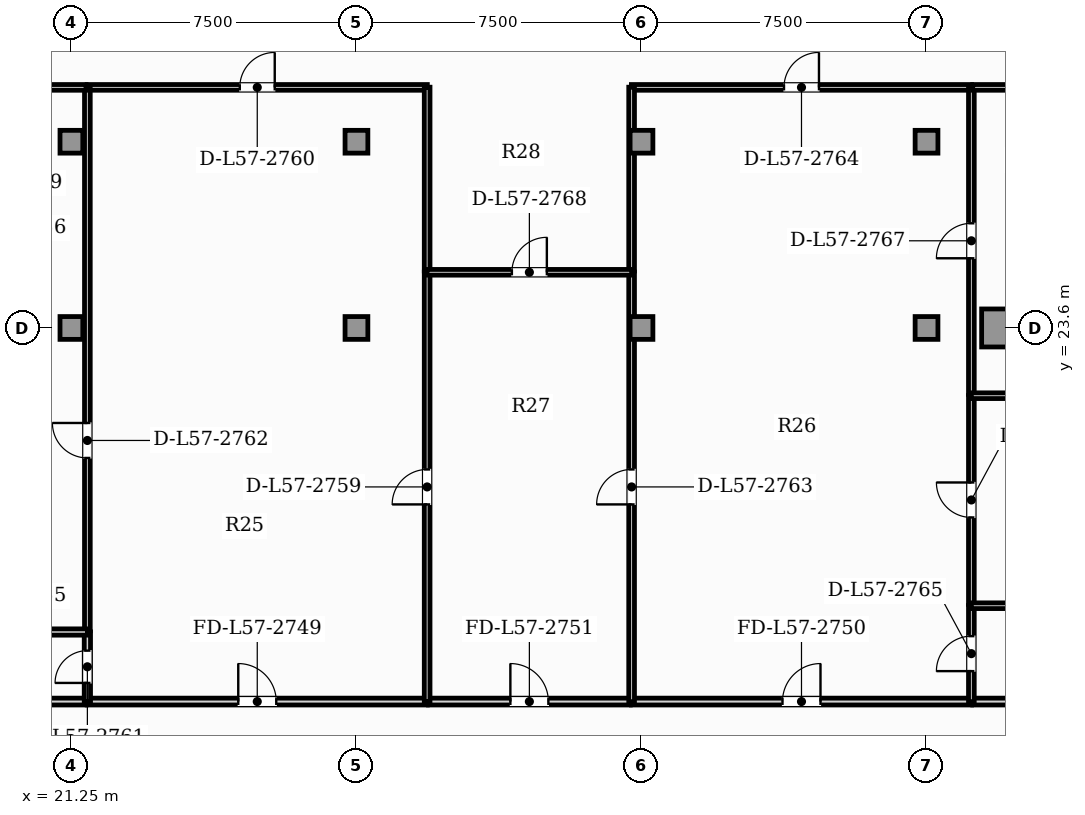
"""IFC4 building model, lengths in metres.
Left out: names, types, materials, properties, quantities, classifications, styles, units other than length and angle.
Written with IfcOpenShell. Run it as: python <this file> out.ifc"""

import sys

from ifc_helpers import new_model, si_unit, direction, frame, frame_2d, origin, origin_2d, place, context, subcontext, project, spatial, rectangle, hollow_rectangle, extrude, element, fill, save


model = new_model("IFC4")
c1 = context("Model", 3, precision=1e-05, world=origin(), true_north=direction((0.0, 1.0)))
c2 = subcontext(c1, "Body", "Model", "MODEL_VIEW")
j1 = project(units=[si_unit("LENGTHUNIT", "METRE"), si_unit("PLANEANGLEUNIT", "RADIAN")], contexts=[c1])
p1 = place(None, origin())
s1 = spatial("IfcSite", under=j1, at=p1, CompositionType="ELEMENT")
p2 = place(p1, origin())
s2 = spatial("IfcBuilding", under=s1, at=p2, CompositionType="ELEMENT")
p3 = place(p2, frame((0.0, 0.0, 231.1)))
s3 = spatial("IfcBuildingStorey", under=s2, at=p3, CompositionType="ELEMENT", Elevation=231.1)
p4 = place(p3, frame((45.7, 23.6, 0.0), z_axis=(0.0, 0.0, 1.0), x_axis=(1.0, 0.0, 0.0)))
e1 = element("IfcColumn", 1, at=p4, inside=s3, PredefinedType="USERDEFINED", context=c2, shape_type="SweptSolid", body=[
    extrude(hollow_rectangle(XDim=1.0, YDim=1.0, WallThickness=0.06, at=origin_2d()), origin(), (0.0, 0.0, 1.0), 3.85),
])
for number, where, z_axis, x_axis in (
    (2, (21.25, 23.6, 0.0), (0.0, 0.0, 1.0), (1.0, 0.0, 0.0)),
    (3, (28.75, 23.6, 0.0), (0.0, 0.0, 1.0), (1.0, 0.0, 0.0)),
    (4, (36.25, 23.6, 0.0), (0.0, 0.0, 1.0), (1.0, 0.0, 0.0)),
    (5, (43.75, 23.6, 0.0), (0.0, 0.0, 1.0), (1.0, 0.0, 0.0)),
    (6, (21.25, 28.5, 0.0), (0.0, 0.0, 1.0), (1.0, 0.0, 0.0)),
    (7, (28.75, 28.5, 0.0), (0.0, 0.0, 1.0), (1.0, 0.0, 0.0)),
    (8, (36.25, 28.5, 0.0), (0.0, 0.0, 1.0), (1.0, 0.0, 0.0)),
    (9, (43.75, 28.5, 0.0), (0.0, 0.0, 1.0), (1.0, 0.0, 0.0)),
):
    element("IfcColumn", number, at=place(p3, frame(where, z_axis=z_axis, x_axis=x_axis)), inside=s3, PredefinedType="COLUMN", context=c2, shape_type="SweptSolid", body=[
        extrude(rectangle(XDim=0.6, YDim=0.6, at=origin_2d()), origin(), (0.0, 0.0, 1.0), 3.85),
    ])
p5 = place(p3, frame((21.665, 13.77, 0.0), z_axis=(0.0, 0.0, 1.0), x_axis=(1.0, 0.0, 0.0)))
e10 = element("IfcWall", 10, at=p5, inside=s3, PredefinedType="PARTITIONING", context=c2, shape_type="SweptSolid", body=[
    extrude(rectangle(XDim=8.95, YDim=0.18, at=frame_2d((4.475, 0.0))), origin(), (0.0, 0.0, 1.0), 3.63),
])
p6 = place(p5, frame((3.975, 0.0, 0.0)))
e11 = element("IfcOpeningElement", 11, at=p6, cuts=e10, PredefinedType="OPENING", context=c2, shape_type="SweptSolid", body=[
    extrude(rectangle(XDim=1.0, YDim=2.15, at=frame_2d((0.5, 1.075))), frame((0.0, 0.1, 0.0), z_axis=(0.0, -1.0, 0.0), x_axis=(1.0, 0.0, 0.0)), (0.0, 0.0, 1.0), 0.2),
])
p7 = place(p3, frame((35.985, 13.77, 0.0), z_axis=(0.0, 0.0, 1.0), x_axis=(1.0, 0.0, 0.0)))
e12 = element("IfcWall", 12, at=p7, inside=s3, PredefinedType="PARTITIONING", context=c2, shape_type="SweptSolid", body=[
    extrude(rectangle(XDim=8.95, YDim=0.18, at=frame_2d((4.475, 0.0))), origin(), (0.0, 0.0, 1.0), 3.63),
])
p8 = place(p7, frame((3.975, 0.0, 0.0)))
e13 = element("IfcOpeningElement", 13, at=p8, cuts=e12, PredefinedType="OPENING", context=c2, shape_type="SweptSolid", body=[
    extrude(rectangle(XDim=1.0, YDim=2.15, at=frame_2d((0.5, 1.075))), frame((0.0, 0.1, 0.0), z_axis=(0.0, -1.0, 0.0), x_axis=(1.0, 0.0, 0.0)), (0.0, 0.0, 1.0), 0.2),
])
p9 = place(p3, frame((30.645, 13.77, 0.0), z_axis=(0.0, 0.0, 1.0), x_axis=(1.0, 0.0, 0.0)))
e14 = element("IfcWall", 14, at=p9, inside=s3, PredefinedType="PARTITIONING", context=c2, shape_type="SweptSolid", body=[
    extrude(rectangle(XDim=5.31, YDim=0.18, at=frame_2d((2.655, 0.0))), origin(), (0.0, 0.0, 1.0), 3.63),
])
p10 = place(p9, frame((2.155, 0.0, 0.0)))
e15 = element("IfcOpeningElement", 15, at=p10, cuts=e14, PredefinedType="OPENING", context=c2, shape_type="SweptSolid", body=[
    extrude(rectangle(XDim=1.0, YDim=2.15, at=frame_2d((0.5, 1.075))), frame((0.0, 0.1, 0.0), z_axis=(0.0, -1.0, 0.0), x_axis=(1.0, 0.0, 0.0)), (0.0, 0.0, 1.0), 0.2),
])
p11 = place(p3, frame((17.385, 13.77, 0.0), z_axis=(0.0, 0.0, 1.0), x_axis=(1.0, 0.0, 0.0)))
e16 = element("IfcWall", 16, at=p11, inside=s3, PredefinedType="PARTITIONING", context=c2, shape_type="SweptSolid", body=[
    extrude(rectangle(XDim=4.25, YDim=0.18, at=frame_2d((2.125, 0.0))), origin(), (0.0, 0.0, 1.0), 3.63),
])
p12 = place(p3, frame((44.965, 13.77, 0.0), z_axis=(0.0, 0.0, 1.0), x_axis=(1.0, 0.0, 0.0)))
e17 = element("IfcWall", 17, at=p12, inside=s3, PredefinedType="PARTITIONING", context=c2, shape_type="SweptSolid", body=[
    extrude(rectangle(XDim=4.862, YDim=0.18, at=frame_2d((2.431, 0.0))), origin(), (0.0, 0.0, 1.0), 3.63),
])
p13 = place(p3, frame((30.61, 13.765, 0.0), z_axis=(0.0, 0.0, 1.0), x_axis=(0.0, 1.0, 0.0)))
e18 = element("IfcWall", 18, at=p13, inside=s3, PredefinedType="PARTITIONING", context=c2, shape_type="SweptSolid", body=[
    extrude(rectangle(XDim=11.305, YDim=0.15, at=frame_2d((5.652, 0.0))), origin(), (0.0, 0.0, 1.0), 3.63),
])
p14 = place(p13, frame((5.192, 0.0, 0.0)))
e19 = element("IfcOpeningElement", 19, at=p14, cuts=e18, PredefinedType="OPENING", context=c2, shape_type="SweptSolid", body=[
    extrude(rectangle(XDim=0.92, YDim=2.1, at=frame_2d((0.46, 1.05))), frame((0.0, 0.085, 0.0), z_axis=(0.0, -1.0, 0.0), x_axis=(1.0, 0.0, 0.0)), (0.0, 0.0, 1.0), 0.17),
])
p15 = place(p3, frame((21.665, 29.93, 0.0), z_axis=(0.0, 0.0, 1.0), x_axis=(1.0, 0.0, 0.0)))
e20 = element("IfcWall", 20, at=p15, inside=s3, PredefinedType="PARTITIONING", context=c2, shape_type="SweptSolid", body=[
    extrude(rectangle(XDim=8.95, YDim=0.15, at=frame_2d((4.475, 0.0))), origin(), (0.0, 0.0, 1.0), 3.63),
])
p16 = place(p15, frame((4.015, 0.0, 0.0)))
e21 = element("IfcOpeningElement", 21, at=p16, cuts=e20, PredefinedType="OPENING", context=c2, shape_type="SweptSolid", body=[
    extrude(rectangle(XDim=0.92, YDim=2.1, at=frame_2d((0.46, 1.05))), frame((0.0, 0.085, 0.0), z_axis=(0.0, -1.0, 0.0), x_axis=(1.0, 0.0, 0.0)), (0.0, 0.0, 1.0), 0.17),
])
p17 = place(p3, frame((30.61, 25.1, 0.0), z_axis=(0.0, 0.0, 1.0), x_axis=(0.0, 1.0, 0.0)))
e22 = element("IfcWall", 22, at=p17, inside=s3, PredefinedType="PARTITIONING", context=c2, shape_type="SweptSolid", body=[
    extrude(rectangle(XDim=4.835, YDim=0.15, at=frame_2d((2.417, 0.0))), origin(), (0.0, 0.0, 1.0), 3.63),
])
p18 = place(p3, frame((21.67, 13.765, 0.0), z_axis=(0.0, 0.0, 1.0), x_axis=(0.0, 1.0, 0.0)))
e23 = element("IfcWall", 23, at=p18, inside=s3, PredefinedType="PLUMBINGWALL", context=c2, shape_type="SweptSolid", body=[
    extrude(rectangle(XDim=1.84, YDim=0.165, at=frame_2d((0.92, 0.0))), origin(), (0.0, 0.0, 1.0), 3.63),
])
p19 = place(p18, frame((0.495, 0.0, 0.0)))
e24 = element("IfcOpeningElement", 24, at=p19, cuts=e23, PredefinedType="OPENING", context=c2, shape_type="SweptSolid", body=[
    extrude(rectangle(XDim=0.85, YDim=2.1, at=frame_2d((0.425, 1.05))), frame((0.0, 0.093, 0.0), z_axis=(0.0, -1.0, 0.0), x_axis=(1.0, 0.0, 0.0)), (0.0, 0.0, 1.0), 0.185),
])
p20 = place(p3, frame((21.67, 15.635, 0.0), z_axis=(0.0, 0.0, 1.0), x_axis=(0.0, 1.0, 0.0)))
e25 = element("IfcWall", 25, at=p20, inside=s3, PredefinedType="PARTITIONING", context=c2, shape_type="SweptSolid", body=[
    extrude(rectangle(XDim=14.3, YDim=0.15, at=frame_2d((7.15, 0.0))), origin(), (0.0, 0.0, 1.0), 3.63),
])
p21 = place(p20, frame((4.545, 0.0, 0.0)))
e26 = element("IfcOpeningElement", 26, at=p21, cuts=e25, PredefinedType="OPENING", context=c2, shape_type="SweptSolid", body=[
    extrude(rectangle(XDim=0.92, YDim=2.1, at=frame_2d((0.46, 1.05))), frame((0.0, 0.085, 0.0), z_axis=(0.0, -1.0, 0.0), x_axis=(1.0, 0.0, 0.0)), (0.0, 0.0, 1.0), 0.17),
])
p22 = place(p3, frame((35.99, 13.765, 0.0), z_axis=(0.0, 0.0, 1.0), x_axis=(0.0, 1.0, 0.0)))
e27 = element("IfcWall", 27, at=p22, inside=s3, PredefinedType="PARTITIONING", context=c2, shape_type="SweptSolid", body=[
    extrude(rectangle(XDim=11.305, YDim=0.15, at=frame_2d((5.652, 0.0))), origin(), (0.0, 0.0, 1.0), 3.63),
])
p23 = place(p22, frame((5.192, 0.0, 0.0)))
e28 = element("IfcOpeningElement", 28, at=p23, cuts=e27, PredefinedType="OPENING", context=c2, shape_type="SweptSolid", body=[
    extrude(rectangle(XDim=0.92, YDim=2.1, at=frame_2d((0.46, 1.05))), frame((0.0, 0.085, 0.0), z_axis=(0.0, -1.0, 0.0), x_axis=(1.0, 0.0, 0.0)), (0.0, 0.0, 1.0), 0.17),
])
p24 = place(p3, frame((35.985, 29.93, 0.0), z_axis=(0.0, 0.0, 1.0), x_axis=(1.0, 0.0, 0.0)))
e29 = element("IfcWall", 29, at=p24, inside=s3, PredefinedType="PARTITIONING", context=c2, shape_type="SweptSolid", body=[
    extrude(rectangle(XDim=8.95, YDim=0.15, at=frame_2d((4.475, 0.0))), origin(), (0.0, 0.0, 1.0), 3.63),
])
p25 = place(p24, frame((4.015, 0.0, 0.0)))
e30 = element("IfcOpeningElement", 30, at=p25, cuts=e29, PredefinedType="OPENING", context=c2, shape_type="SweptSolid", body=[
    extrude(rectangle(XDim=0.92, YDim=2.1, at=frame_2d((0.46, 1.05))), frame((0.0, 0.085, 0.0), z_axis=(0.0, -1.0, 0.0), x_axis=(1.0, 0.0, 0.0)), (0.0, 0.0, 1.0), 0.17),
])
p26 = place(p3, frame((35.99, 25.1, 0.0), z_axis=(0.0, 0.0, 1.0), x_axis=(0.0, 1.0, 0.0)))
e31 = element("IfcWall", 31, at=p26, inside=s3, PredefinedType="PARTITIONING", context=c2, shape_type="SweptSolid", body=[
    extrude(rectangle(XDim=4.835, YDim=0.15, at=frame_2d((2.417, 0.0))), origin(), (0.0, 0.0, 1.0), 3.63),
])
p27 = place(p3, frame((44.93, 13.765, 0.0), z_axis=(0.0, 0.0, 1.0), x_axis=(0.0, 1.0, 0.0)))
e32 = element("IfcWall", 32, at=p27, inside=s3, PredefinedType="PARTITIONING", context=c2, shape_type="SweptSolid", body=[
    extrude(rectangle(XDim=2.531, YDim=0.15, at=frame_2d((1.266, 0.0))), origin(), (0.0, 0.0, 1.0), 3.63),
])
p28 = place(p27, frame((0.806, 0.0, 0.0)))
e33 = element("IfcOpeningElement", 33, at=p28, cuts=e32, PredefinedType="OPENING", context=c2, shape_type="SweptSolid", body=[
    extrude(rectangle(XDim=0.92, YDim=2.1, at=frame_2d((0.46, 1.05))), frame((0.0, 0.085, 0.0), z_axis=(0.0, -1.0, 0.0), x_axis=(1.0, 0.0, 0.0)), (0.0, 0.0, 1.0), 0.17),
])
p29 = place(p3, frame((44.93, 16.326, 0.0), z_axis=(0.0, 0.0, 1.0), x_axis=(0.0, 1.0, 0.0)))
e34 = element("IfcWall", 34, at=p29, inside=s3, PredefinedType="PARTITIONING", context=c2, shape_type="SweptSolid", body=[
    extrude(rectangle(XDim=5.496, YDim=0.15, at=frame_2d((2.748, 0.0))), origin(), (0.0, 0.0, 1.0), 3.63),
])
p30 = place(p29, frame((2.288, 0.0, 0.0)))
e35 = element("IfcOpeningElement", 35, at=p30, cuts=e34, PredefinedType="OPENING", context=c2, shape_type="SweptSolid", body=[
    extrude(rectangle(XDim=0.92, YDim=2.1, at=frame_2d((0.46, 1.05))), frame((0.0, 0.085, 0.0), z_axis=(0.0, -1.0, 0.0), x_axis=(1.0, 0.0, 0.0)), (0.0, 0.0, 1.0), 0.17),
])
p31 = place(p3, frame((44.93, 21.853, 0.0), z_axis=(0.0, 0.0, 1.0), x_axis=(0.0, 1.0, 0.0)))
e36 = element("IfcWall", 36, at=p31, inside=s3, PredefinedType="PARTITIONING", context=c2, shape_type="SweptSolid", body=[
    extrude(rectangle(XDim=8.083, YDim=0.15, at=frame_2d((4.041, 0.0))), origin(), (0.0, 0.0, 1.0), 3.63),
])
p32 = place(p31, frame((3.581, 0.0, 0.0)))
e37 = element("IfcOpeningElement", 37, at=p32, cuts=e36, PredefinedType="OPENING", context=c2, shape_type="SweptSolid", body=[
    extrude(rectangle(XDim=0.92, YDim=2.1, at=frame_2d((0.46, 1.05))), frame((0.0, 0.085, 0.0), z_axis=(0.0, -1.0, 0.0), x_axis=(1.0, 0.0, 0.0)), (0.0, 0.0, 1.0), 0.17),
])
p33 = place(p3, frame((30.605, 25.065, 0.0), z_axis=(0.0, 0.0, 1.0), x_axis=(1.0, 0.0, 0.0)))
e38 = element("IfcWall", 38, at=p33, inside=s3, PredefinedType="PARTITIONING", context=c2, shape_type="SweptSolid", body=[
    extrude(rectangle(XDim=5.39, YDim=0.15, at=frame_2d((2.695, 0.0))), origin(), (0.0, 0.0, 1.0), 3.63),
])
p34 = place(p33, frame((2.235, 0.0, 0.0)))
e39 = element("IfcOpeningElement", 39, at=p34, cuts=e38, PredefinedType="OPENING", context=c2, shape_type="SweptSolid", body=[
    extrude(rectangle(XDim=0.92, YDim=2.1, at=frame_2d((0.46, 1.05))), frame((0.0, 0.085, 0.0), z_axis=(0.0, -1.0, 0.0), x_axis=(1.0, 0.0, 0.0)), (0.0, 0.0, 1.0), 0.17),
])
p35 = place(p3, frame((17.385, 29.93, 0.0), z_axis=(0.0, 0.0, 1.0), x_axis=(1.0, 0.0, 0.0)))
e40 = element("IfcWall", 40, at=p35, inside=s3, PredefinedType="PARTITIONING", context=c2, shape_type="SweptSolid", body=[
    extrude(rectangle(XDim=4.25, YDim=0.15, at=frame_2d((2.125, 0.0))), origin(), (0.0, 0.0, 1.0), 3.63),
])
p36 = place(p35, frame((1.665, 0.0, 0.0)))
e41 = element("IfcOpeningElement", 41, at=p36, cuts=e40, PredefinedType="OPENING", context=c2, shape_type="SweptSolid", body=[
    extrude(rectangle(XDim=0.92, YDim=2.1, at=frame_2d((0.46, 1.05))), frame((0.0, 0.085, 0.0), z_axis=(0.0, -1.0, 0.0), x_axis=(1.0, 0.0, 0.0)), (0.0, 0.0, 1.0), 0.17),
])
p37 = place(p3, frame((44.965, 29.93, 0.0), z_axis=(0.0, 0.0, 1.0), x_axis=(1.0, 0.0, 0.0)))
e42 = element("IfcWall", 42, at=p37, inside=s3, PredefinedType="PARTITIONING", context=c2, shape_type="SweptSolid", body=[
    extrude(rectangle(XDim=4.862, YDim=0.15, at=frame_2d((2.431, 0.0))), origin(), (0.0, 0.0, 1.0), 3.63),
])
p38 = place(p37, frame((1.971, 0.0, 0.0)))
e43 = element("IfcOpeningElement", 43, at=p38, cuts=e42, PredefinedType="OPENING", context=c2, shape_type="SweptSolid", body=[
    extrude(rectangle(XDim=0.92, YDim=2.1, at=frame_2d((0.46, 1.05))), frame((0.0, 0.085, 0.0), z_axis=(0.0, -1.0, 0.0), x_axis=(1.0, 0.0, 0.0)), (0.0, 0.0, 1.0), 0.17),
])
p39 = place(p3, frame((17.385, 15.6, 0.0), z_axis=(0.0, 0.0, 1.0), x_axis=(1.0, 0.0, 0.0)))
e44 = element("IfcWall", 44, at=p39, inside=s3, PredefinedType="PLUMBINGWALL", context=c2, shape_type="SweptSolid", body=[
    extrude(rectangle(XDim=4.29, YDim=0.165, at=frame_2d((2.145, 0.0))), origin(), (0.0, 0.0, 1.0), 3.63),
])
for number, where, z_axis, x_axis in (
    (45, (44.925, 16.292, 0.0), (0.0, 0.0, 1.0), (1.0, 0.0, 0.0)),
    (46, (44.925, 21.817, 0.0), (0.0, 0.0, 1.0), (1.0, 0.0, 0.0)),
):
    element("IfcWall", number, at=place(p3, frame(where, z_axis=z_axis, x_axis=x_axis)), inside=s3, PredefinedType="PARTITIONING", context=c2, shape_type="SweptSolid", body=[
        extrude(rectangle(XDim=4.902, YDim=0.15, at=frame_2d((2.451, 0.0))), origin(), (0.0, 0.0, 1.0), 3.63),
    ])
p40 = place(p6, origin())
e47 = element("IfcDoor", 47, at=p40, inside=s3, OperationType="SINGLE_SWING_LEFT", PredefinedType="DOOR", context=c2, shape_type="SweptSolid", body=[
    extrude(rectangle(XDim=1.0, YDim=2.15, at=frame_2d((0.5, 1.075))), frame((0.0, 0.025, 0.0), z_axis=(0.0, -1.0, 0.0), x_axis=(1.0, 0.0, 0.0)), (0.0, 0.0, 1.0), 0.05),
])
fill(e11, e47)
p41 = place(p8, origin())
e48 = element("IfcDoor", 48, at=p41, inside=s3, OperationType="SINGLE_SWING_RIGHT", PredefinedType="DOOR", context=c2, shape_type="SweptSolid", body=[
    extrude(rectangle(XDim=1.0, YDim=2.15, at=frame_2d((0.5, 1.075))), frame((0.0, 0.025, 0.0), z_axis=(0.0, -1.0, 0.0), x_axis=(1.0, 0.0, 0.0)), (0.0, 0.0, 1.0), 0.05),
])
fill(e13, e48)
p42 = place(p10, origin())
e49 = element("IfcDoor", 49, at=p42, inside=s3, OperationType="SINGLE_SWING_LEFT", PredefinedType="DOOR", context=c2, shape_type="SweptSolid", body=[
    extrude(rectangle(XDim=1.0, YDim=2.15, at=frame_2d((0.5, 1.075))), frame((0.0, 0.025, 0.0), z_axis=(0.0, -1.0, 0.0), x_axis=(1.0, 0.0, 0.0)), (0.0, 0.0, 1.0), 0.05),
])
fill(e15, e49)
p43 = place(p14, origin())
e50 = element("IfcDoor", 50, at=p43, inside=s3, OperationType="SINGLE_SWING_LEFT", PredefinedType="DOOR", context=c2, shape_type="SweptSolid", body=[
    extrude(rectangle(XDim=0.92, YDim=2.1, at=frame_2d((0.46, 1.05))), frame((0.0, 0.025, 0.0), z_axis=(0.0, -1.0, 0.0), x_axis=(1.0, 0.0, 0.0)), (0.0, 0.0, 1.0), 0.05),
])
fill(e19, e50)
p44 = place(p16, origin())
e51 = element("IfcDoor", 51, at=p44, inside=s3, OperationType="SINGLE_SWING_RIGHT", PredefinedType="DOOR", context=c2, shape_type="SweptSolid", body=[
    extrude(rectangle(XDim=0.92, YDim=2.1, at=frame_2d((0.46, 1.05))), frame((0.0, 0.025, 0.0), z_axis=(0.0, -1.0, 0.0), x_axis=(1.0, 0.0, 0.0)), (0.0, 0.0, 1.0), 0.05),
])
fill(e21, e51)
p45 = place(p19, origin())
e52 = element("IfcDoor", 52, at=p45, inside=s3, OperationType="SINGLE_SWING_LEFT", PredefinedType="DOOR", context=c2, shape_type="SweptSolid", body=[
    extrude(rectangle(XDim=0.85, YDim=2.1, at=frame_2d((0.425, 1.05))), frame((0.0, 0.025, 0.0), z_axis=(0.0, -1.0, 0.0), x_axis=(1.0, 0.0, 0.0)), (0.0, 0.0, 1.0), 0.05),
])
fill(e24, e52)
p46 = place(p21, origin())
e53 = element("IfcDoor", 53, at=p46, inside=s3, OperationType="SINGLE_SWING_RIGHT", PredefinedType="DOOR", context=c2, shape_type="SweptSolid", body=[
    extrude(rectangle(XDim=0.92, YDim=2.1, at=frame_2d((0.46, 1.05))), frame((0.0, 0.025, 0.0), z_axis=(0.0, -1.0, 0.0), x_axis=(1.0, 0.0, 0.0)), (0.0, 0.0, 1.0), 0.05),
])
fill(e26, e53)
p47 = place(p23, origin())
e54 = element("IfcDoor", 54, at=p47, inside=s3, OperationType="SINGLE_SWING_LEFT", PredefinedType="DOOR", context=c2, shape_type="SweptSolid", body=[
    extrude(rectangle(XDim=0.92, YDim=2.1, at=frame_2d((0.46, 1.05))), frame((0.0, 0.025, 0.0), z_axis=(0.0, -1.0, 0.0), x_axis=(1.0, 0.0, 0.0)), (0.0, 0.0, 1.0), 0.05),
])
fill(e28, e54)
p48 = place(p25, origin())
e55 = element("IfcDoor", 55, at=p48, inside=s3, OperationType="SINGLE_SWING_RIGHT", PredefinedType="DOOR", context=c2, shape_type="SweptSolid", body=[
    extrude(rectangle(XDim=0.92, YDim=2.1, at=frame_2d((0.46, 1.05))), frame((0.0, 0.025, 0.0), z_axis=(0.0, -1.0, 0.0), x_axis=(1.0, 0.0, 0.0)), (0.0, 0.0, 1.0), 0.05),
])
fill(e30, e55)
p49 = place(p28, origin())
e56 = element("IfcDoor", 56, at=p49, inside=s3, OperationType="SINGLE_SWING_LEFT", PredefinedType="DOOR", context=c2, shape_type="SweptSolid", body=[
    extrude(rectangle(XDim=0.92, YDim=2.1, at=frame_2d((0.46, 1.05))), frame((0.0, 0.025, 0.0), z_axis=(0.0, -1.0, 0.0), x_axis=(1.0, 0.0, 0.0)), (0.0, 0.0, 1.0), 0.05),
])
fill(e33, e56)
p50 = place(p30, origin())
e57 = element("IfcDoor", 57, at=p50, inside=s3, OperationType="SINGLE_SWING_RIGHT", PredefinedType="DOOR", context=c2, shape_type="SweptSolid", body=[
    extrude(rectangle(XDim=0.92, YDim=2.1, at=frame_2d((0.46, 1.05))), frame((0.0, 0.025, 0.0), z_axis=(0.0, -1.0, 0.0), x_axis=(1.0, 0.0, 0.0)), (0.0, 0.0, 1.0), 0.05),
])
fill(e35, e57)
p51 = place(p32, origin())
e58 = element("IfcDoor", 58, at=p51, inside=s3, OperationType="SINGLE_SWING_LEFT", PredefinedType="DOOR", context=c2, shape_type="SweptSolid", body=[
    extrude(rectangle(XDim=0.92, YDim=2.1, at=frame_2d((0.46, 1.05))), frame((0.0, 0.025, 0.0), z_axis=(0.0, -1.0, 0.0), x_axis=(1.0, 0.0, 0.0)), (0.0, 0.0, 1.0), 0.05),
])
fill(e37, e58)
p52 = place(p34, origin())
e59 = element("IfcDoor", 59, at=p52, inside=s3, OperationType="SINGLE_SWING_RIGHT", PredefinedType="DOOR", context=c2, shape_type="SweptSolid", body=[
    extrude(rectangle(XDim=0.92, YDim=2.1, at=frame_2d((0.46, 1.05))), frame((0.0, 0.025, 0.0), z_axis=(0.0, -1.0, 0.0), x_axis=(1.0, 0.0, 0.0)), (0.0, 0.0, 1.0), 0.05),
])
fill(e39, e59)
save(model, sys.argv[1])
